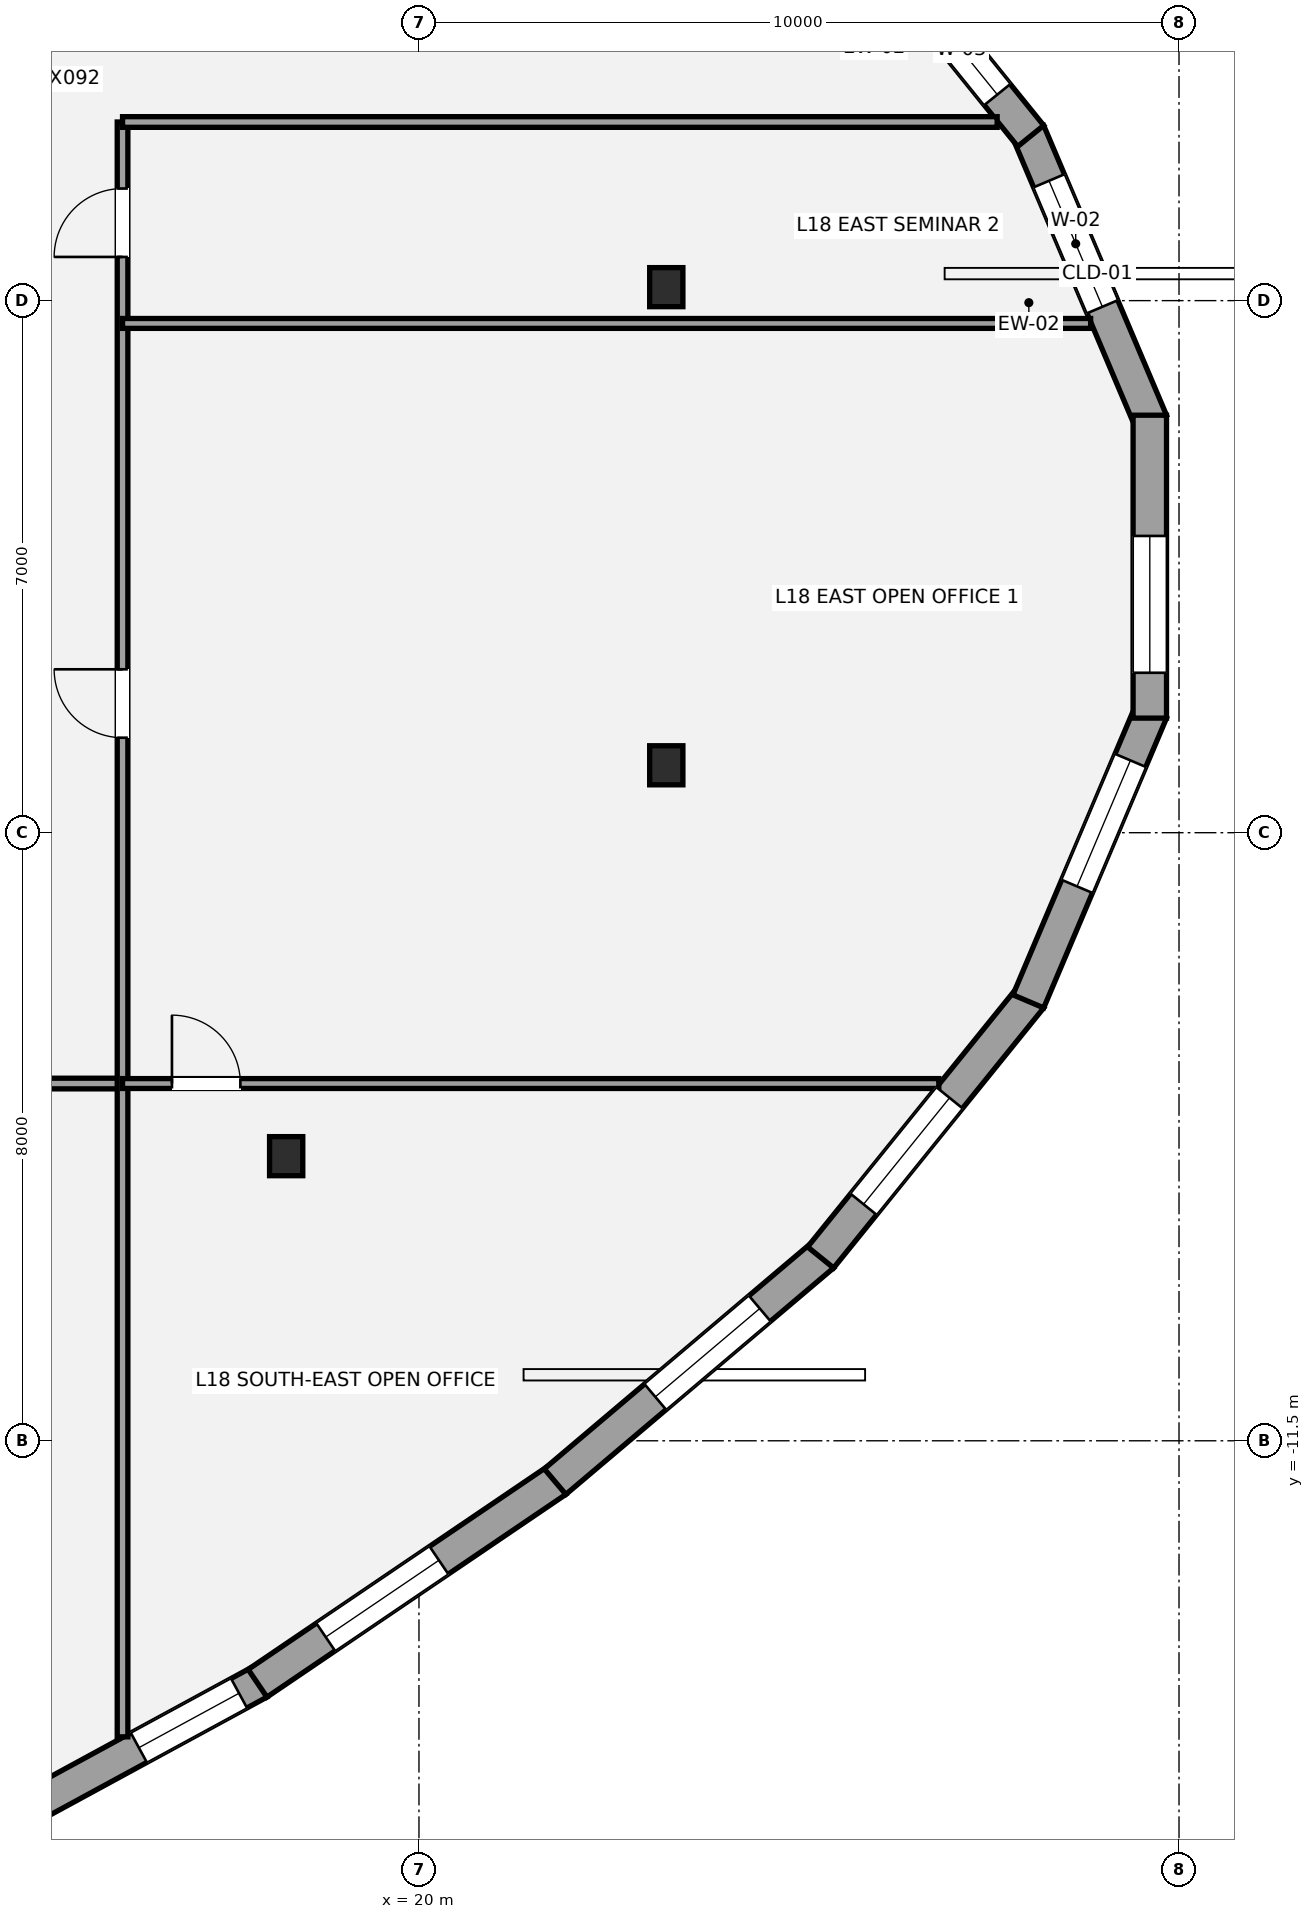
"""IFC4 building model, lengths in metres.
Left out: names, types, materials, properties, quantities, classifications, styles, units other than length and angle.
Written with IfcOpenShell. Run it as: python <this file> out.ifc"""

import sys

from ifc_helpers import new_model, si_unit, direction, frame, frame_2d, origin, origin_2d, place, context, subcontext, project, spatial, rectangle, i_section, extrude, element, fill, save


model = new_model("IFC4")
c1 = context("Model", 3, precision=1e-05, world=origin(), true_north=direction((0.0, 1.0)))
c2 = subcontext(c1, "Body", "Model", "MODEL_VIEW")
j1 = project(units=[si_unit("LENGTHUNIT", "METRE"), si_unit("PLANEANGLEUNIT", "RADIAN")], contexts=[c1])
p1 = place(None, origin())
s1 = spatial("IfcSite", under=j1, at=p1, CompositionType="ELEMENT")
p2 = place(p1, origin())
s2 = spatial("IfcBuilding", under=s1, at=p2, CompositionType="ELEMENT")
p3 = place(p2, frame((0.0, 0.0, 70.2)))
s3 = spatial("IfcBuildingStorey", under=s2, at=p3, CompositionType="ELEMENT", Elevation=70.2)
for number, where, z_axis, x_axis in (
    (1, (23.254, 3.677, 0.0), (0.0, 0.0, 1.0), (1.0, 0.0, 0.0)),
    (2, (18.253, -7.756, 0.0), (0.0, 0.0, 1.0), (1.0, 0.0, 0.0)),
    (3, (23.254, -2.613, 0.0), (0.0, 0.0, 1.0), (1.0, 0.0, 0.0)),
):
    element("IfcColumn", number, at=place(p3, frame(where, z_axis=z_axis, x_axis=x_axis)), inside=s3, PredefinedType="COLUMN", context=c2, shape_type="SweptSolid", body=[
        extrude(i_section(OverallWidth=0.437, OverallDepth=0.514, WebThickness=0.061, FlangeThickness=0.097, at=origin_2d()), origin(), (0.0, 0.0, 1.0), 3.6),
    ])
p4 = place(p3, frame((28.017, 5.719, 0.0), z_axis=(0.0, 0.0, 1.0), x_axis=(0.39024393086, -0.92071150445, 0.0)))
e4 = element("IfcWall", 4, at=p4, inside=s3, PredefinedType="STANDARD", context=c2, shape_type="SweptSolid", body=[
    extrude(rectangle(XDim=4.14, YDim=0.44, at=frame_2d((2.07, 0.0))), origin(), (0.0, 0.0, 1.0), 2.529),
])
p5 = place(p4, frame((0.698, 0.0, 0.65)))
e5 = element("IfcOpeningElement", 5, at=p5, cuts=e4, PredefinedType="OPENING", context=c2, shape_type="SweptSolid", body=[
    extrude(rectangle(XDim=1.8, YDim=1.7, at=frame_2d((0.9, 0.85))), frame((0.0, 0.23, 0.0), z_axis=(0.0, -1.0, 0.0), x_axis=(1.0, 0.0, 0.0)), (0.0, 0.0, 1.0), 0.46),
])
p6 = place(p3, frame((25.284, 9.088, 0.0), z_axis=(0.0, 0.0, 1.0), x_axis=(0.628444327975, -0.777854566507, 0.0)))
e6 = element("IfcWall", 6, at=p6, inside=s3, PredefinedType="STANDARD", context=c2, shape_type="SweptSolid", body=[
    extrude(rectangle(XDim=4.399, YDim=0.44, at=frame_2d((2.199, 0.0))), origin(), (0.0, 0.0, 1.0), 2.529),
])
p7 = place(p6, frame((2.199, 0.0, 0.65)))
e7 = element("IfcOpeningElement", 7, at=p7, cuts=e6, PredefinedType="OPENING", context=c2, shape_type="SweptSolid", body=[
    extrude(rectangle(XDim=1.5, YDim=1.7, at=frame_2d((0.75, 0.85))), frame((0.0, 0.23, 0.0), z_axis=(0.0, -1.0, 0.0), x_axis=(1.0, 0.0, 0.0)), (0.0, 0.0, 1.0), 0.46),
])
p8 = place(p3, frame((17.895, -14.679, 0.0), z_axis=(0.0, 0.0, 1.0), x_axis=(-0.878571961318, -0.477609996531, 0.0)))
e8 = element("IfcWall", 8, at=p8, inside=s3, PredefinedType="STANDARD", context=c2, shape_type="SweptSolid", body=[
    extrude(rectangle(XDim=5.001, YDim=0.44, at=frame_2d((2.5, 0.0))), origin(), (0.0, 0.0, 1.0), 2.529),
])
p9 = place(p8, frame((0.298, 0.0, 0.65)))
e9 = element("IfcOpeningElement", 9, at=p9, cuts=e8, PredefinedType="OPENING", context=c2, shape_type="SweptSolid", body=[
    extrude(rectangle(XDim=1.5, YDim=1.7, at=frame_2d((0.75, 0.85))), frame((0.0, 0.23, 0.0), z_axis=(0.0, -1.0, 0.0), x_axis=(1.0, 0.0, 0.0)), (0.0, 0.0, 1.0), 0.46),
])
p10 = place(p3, frame((21.809, -12.023, 0.0), z_axis=(0.0, 0.0, 1.0), x_axis=(-0.827645395623, -0.561251368911, 0.0)))
e10 = element("IfcWall", 10, at=p10, inside=s3, PredefinedType="STANDARD", context=c2, shape_type="SweptSolid", body=[
    extrude(rectangle(XDim=4.752, YDim=0.44, at=frame_2d((2.376, 0.0))), origin(), (0.0, 0.0, 1.0), 2.529),
])
p11 = place(p10, frame((1.869, 0.0, 0.65)))
e11 = element("IfcOpeningElement", 11, at=p11, cuts=e10, PredefinedType="OPENING", context=c2, shape_type="SweptSolid", body=[
    extrude(rectangle(XDim=1.8, YDim=1.7, at=frame_2d((0.9, 0.85))), frame((0.0, 0.23, 0.0), z_axis=(0.0, -1.0, 0.0), x_axis=(1.0, 0.0, 0.0)), (0.0, 0.0, 1.0), 0.46),
])
p12 = place(p3, frame((25.313, -9.058, 0.0), z_axis=(0.0, 0.0, 1.0), x_axis=(-0.763546839071, -0.645752448346, 0.0)))
e12 = element("IfcWall", 12, at=p12, inside=s3, PredefinedType="STANDARD", context=c2, shape_type="SweptSolid", body=[
    extrude(rectangle(XDim=4.614, YDim=0.44, at=frame_2d((2.307, 0.0))), origin(), (0.0, 0.0, 1.0), 2.529),
])
p13 = place(p12, frame((1.087, 0.0, 0.65)))
e13 = element("IfcOpeningElement", 13, at=p13, cuts=e12, PredefinedType="OPENING", context=c2, shape_type="SweptSolid", body=[
    extrude(rectangle(XDim=1.8, YDim=1.7, at=frame_2d((0.9, 0.85))), frame((0.0, 0.23, 0.0), z_axis=(0.0, -1.0, 0.0), x_axis=(1.0, 0.0, 0.0)), (0.0, 0.0, 1.0), 0.46),
])
p14 = place(p3, frame((28.049, -5.666, 0.0), z_axis=(0.0, 0.0, 1.0), x_axis=(-0.628444327975, -0.777854566507, 0.0)))
e14 = element("IfcWall", 14, at=p14, inside=s3, PredefinedType="STANDARD", context=c2, shape_type="SweptSolid", body=[
    extrude(rectangle(XDim=4.399, YDim=0.44, at=frame_2d((2.199, 0.0))), origin(), (0.0, 0.0, 1.0), 2.529),
])
p15 = place(p14, frame((1.699, 0.0, 0.65)))
e15 = element("IfcOpeningElement", 15, at=p15, cuts=e14, PredefinedType="OPENING", context=c2, shape_type="SweptSolid", body=[
    extrude(rectangle(XDim=1.8, YDim=1.7, at=frame_2d((0.9, 0.85))), frame((0.0, 0.23, 0.0), z_axis=(0.0, -1.0, 0.0), x_axis=(1.0, 0.0, 0.0)), (0.0, 0.0, 1.0), 0.46),
])
p16 = place(p3, frame((29.633, -1.907, 0.0), z_axis=(0.0, 0.0, 1.0), x_axis=(-0.39024393086, -0.92071150445, 0.0)))
e16 = element("IfcWall", 16, at=p16, inside=s3, PredefinedType="STANDARD", context=c2, shape_type="SweptSolid", body=[
    extrude(rectangle(XDim=4.14, YDim=0.44, at=frame_2d((2.07, 0.0))), origin(), (0.0, 0.0, 1.0), 2.529),
])
p17 = place(p16, frame((0.698, 0.0, 0.65)))
e17 = element("IfcOpeningElement", 17, at=p17, cuts=e16, PredefinedType="OPENING", context=c2, shape_type="SweptSolid", body=[
    extrude(rectangle(XDim=1.8, YDim=1.7, at=frame_2d((0.9, 0.85))), frame((0.0, 0.23, 0.0), z_axis=(0.0, -1.0, 0.0), x_axis=(1.0, 0.0, 0.0)), (0.0, 0.0, 1.0), 0.46),
])
p18 = place(p3, frame((29.615, 1.993, 0.0), z_axis=(0.0, 0.0, 1.0), x_axis=(0.0, -1.0, 0.0)))
e18 = element("IfcWall", 18, at=p18, inside=s3, PredefinedType="STANDARD", context=c2, shape_type="SweptSolid", body=[
    extrude(rectangle(XDim=3.985, YDim=0.44, at=frame_2d((1.993, 0.0))), origin(), (0.0, 0.0, 1.0), 2.529),
])
p19 = place(p18, frame((1.588, 0.0, 0.65)))
e19 = element("IfcOpeningElement", 19, at=p19, cuts=e18, PredefinedType="OPENING", context=c2, shape_type="SweptSolid", body=[
    extrude(rectangle(XDim=1.8, YDim=1.7, at=frame_2d((0.9, 0.85))), frame((0.0, 0.23, 0.0), z_axis=(0.0, -1.0, 0.0), x_axis=(1.0, 0.0, 0.0)), (0.0, 0.0, 1.0), 0.46),
])
p20 = place(p3, frame((-18.6, -6.8, 0.0), z_axis=(0.0, 0.0, 1.0), x_axis=(1.0, 0.0, 0.0)))
e20 = element("IfcWall", 20, at=p20, inside=s3, PredefinedType="PARTITIONING", context=c2, shape_type="SweptSolid", body=[
    extrude(rectangle(XDim=34.7, YDim=0.14, at=frame_2d((17.35, 0.0))), origin(), (0.0, 0.0, 1.0), 2.853),
])
p21 = place(p20, frame((4.35, 0.0, 0.0)))
e21 = element("IfcOpeningElement", 21, at=p21, cuts=e20, PredefinedType="OPENING", context=c2, shape_type="SweptSolid", body=[
    extrude(rectangle(XDim=0.9, YDim=2.1, at=frame_2d((0.45, 1.05))), frame((0.0, 0.08, 0.0), z_axis=(0.0, -1.0, 0.0), x_axis=(1.0, 0.0, 0.0)), (0.0, 0.0, 1.0), 0.16),
])
p22 = place(p20, frame((13.65, 0.0, 0.0)))
e22 = element("IfcOpeningElement", 22, at=p22, cuts=e20, PredefinedType="OPENING", context=c2, shape_type="SweptSolid", body=[
    extrude(rectangle(XDim=0.9, YDim=2.1, at=frame_2d((0.45, 1.05))), frame((0.0, 0.08, 0.0), z_axis=(0.0, -1.0, 0.0), x_axis=(1.0, 0.0, 0.0)), (0.0, 0.0, 1.0), 0.16),
])
p23 = place(p20, frame((22.65, 0.0, 0.0)))
e23 = element("IfcOpeningElement", 23, at=p23, cuts=e20, PredefinedType="OPENING", context=c2, shape_type="SweptSolid", body=[
    extrude(rectangle(XDim=0.9, YDim=2.1, at=frame_2d((0.45, 1.05))), frame((0.0, 0.08, 0.0), z_axis=(0.0, -1.0, 0.0), x_axis=(1.0, 0.0, 0.0)), (0.0, 0.0, 1.0), 0.16),
])
p24 = place(p20, frame((30.4, 0.0, 0.0)))
e24 = element("IfcOpeningElement", 24, at=p24, cuts=e20, PredefinedType="OPENING", context=c2, shape_type="SweptSolid", body=[
    extrude(rectangle(XDim=1.5, YDim=2.15, at=frame_2d((0.75, 1.075))), frame((0.0, 0.08, 0.0), z_axis=(0.0, -1.0, 0.0), x_axis=(1.0, 0.0, 0.0)), (0.0, 0.0, 1.0), 0.16),
])
p25 = place(p3, frame((16.1, -15.395, 0.0), z_axis=(0.0, 0.0, 1.0), x_axis=(0.0, 1.0, 0.0)))
e25 = element("IfcWall", 25, at=p25, inside=s3, PredefinedType="PARTITIONING", context=c2, shape_type="SweptSolid", body=[
    extrude(rectangle(XDim=21.245, YDim=0.14, at=frame_2d((10.623, 0.0))), origin(), (0.0, 0.0, 1.0), 2.841),
])
p26 = place(p25, frame((13.145, 0.0, 0.0)))
e26 = element("IfcOpeningElement", 26, at=p26, cuts=e25, PredefinedType="OPENING", context=c2, shape_type="SweptSolid", body=[
    extrude(rectangle(XDim=0.9, YDim=2.1, at=frame_2d((0.45, 1.05))), frame((0.0, 0.08, 0.0), z_axis=(0.0, -1.0, 0.0), x_axis=(1.0, 0.0, 0.0)), (0.0, 0.0, 1.0), 0.16),
])
p27 = place(p25, frame((19.47, 0.0, 0.0)))
e27 = element("IfcOpeningElement", 27, at=p27, cuts=e25, PredefinedType="OPENING", context=c2, shape_type="SweptSolid", body=[
    extrude(rectangle(XDim=0.9, YDim=2.1, at=frame_2d((0.45, 1.05))), frame((0.0, 0.08, 0.0), z_axis=(0.0, -1.0, 0.0), x_axis=(1.0, 0.0, 0.0)), (0.0, 0.0, 1.0), 0.16),
])
p28 = place(p3, frame((16.1, 5.85, 0.0), z_axis=(0.0, 0.0, 1.0), x_axis=(1.0, 0.0, 0.0)))
e28 = element("IfcWall", 28, at=p28, inside=s3, PredefinedType="PARTITIONING", context=c2, shape_type="SweptSolid", body=[
    extrude(rectangle(XDim=11.507, YDim=0.14, at=frame_2d((5.754, 0.0))), origin(), (0.0, 0.0, 1.0), 2.853),
])
p29 = place(p3, frame((16.1, -6.8, 0.0), z_axis=(0.0, 0.0, 1.0), x_axis=(1.0, 0.0, 0.0)))
e29 = element("IfcWall", 29, at=p29, inside=s3, PredefinedType="PARTITIONING", context=c2, shape_type="SweptSolid", body=[
    extrude(rectangle(XDim=10.74, YDim=0.13, at=frame_2d((5.37, 0.0))), origin(), (0.0, 0.0, 1.0), 2.779),
])
p30 = place(p29, frame((0.65, 0.0, 0.0)))
e30 = element("IfcOpeningElement", 30, at=p30, cuts=e29, PredefinedType="OPENING", context=c2, shape_type="SweptSolid", body=[
    extrude(rectangle(XDim=0.9, YDim=2.1, at=frame_2d((0.45, 1.05))), frame((0.0, 0.075, 0.0), z_axis=(0.0, -1.0, 0.0), x_axis=(1.0, 0.0, 0.0)), (0.0, 0.0, 1.0), 0.15),
])
p31 = place(p3, frame((16.1, 3.2, 0.0), z_axis=(0.0, 0.0, 1.0), x_axis=(1.0, 0.0, 0.0)))
e31 = element("IfcWall", 31, at=p31, inside=s3, PredefinedType="PARTITIONING", context=c2, shape_type="SweptSolid", body=[
    extrude(rectangle(XDim=12.737, YDim=0.13, at=frame_2d((6.369, 0.0))), origin(), (0.0, 0.0, 1.0), 2.841),
])
p32 = place(p5, origin())
e32 = element("IfcWindow", 32, at=p32, inside=s3, PartitioningType="SINGLE_PANEL", PredefinedType="WINDOW", context=c2, shape_type="SweptSolid", body=[
    extrude(rectangle(XDim=1.8, YDim=1.7, at=frame_2d((0.9, 0.85))), frame((0.0, -0.01, 0.0), z_axis=(0.0, -1.0, 0.0), x_axis=(1.0, 0.0, 0.0)), (0.0, 0.0, 1.0), 0.06),
])
fill(e5, e32)
p33 = place(p7, origin())
e33 = element("IfcWindow", 33, at=p33, inside=s3, PartitioningType="SINGLE_PANEL", PredefinedType="WINDOW", context=c2, shape_type="SweptSolid", body=[
    extrude(rectangle(XDim=1.5, YDim=1.7, at=frame_2d((0.75, 0.85))), frame((0.0, -0.01, 0.0), z_axis=(0.0, -1.0, 0.0), x_axis=(1.0, 0.0, 0.0)), (0.0, 0.0, 1.0), 0.06),
])
fill(e7, e33)
p34 = place(p9, origin())
e34 = element("IfcWindow", 34, at=p34, inside=s3, PartitioningType="SINGLE_PANEL", PredefinedType="WINDOW", context=c2, shape_type="SweptSolid", body=[
    extrude(rectangle(XDim=1.5, YDim=1.7, at=frame_2d((0.75, 0.85))), frame((0.0, -0.01, 0.0), z_axis=(0.0, -1.0, 0.0), x_axis=(1.0, 0.0, 0.0)), (0.0, 0.0, 1.0), 0.06),
])
fill(e9, e34)
p35 = place(p11, origin())
e35 = element("IfcWindow", 35, at=p35, inside=s3, PartitioningType="SINGLE_PANEL", PredefinedType="WINDOW", context=c2, shape_type="SweptSolid", body=[
    extrude(rectangle(XDim=1.8, YDim=1.7, at=frame_2d((0.9, 0.85))), frame((0.0, -0.01, 0.0), z_axis=(0.0, -1.0, 0.0), x_axis=(1.0, 0.0, 0.0)), (0.0, 0.0, 1.0), 0.06),
])
fill(e11, e35)
p36 = place(p13, origin())
e36 = element("IfcWindow", 36, at=p36, inside=s3, PartitioningType="SINGLE_PANEL", PredefinedType="WINDOW", context=c2, shape_type="SweptSolid", body=[
    extrude(rectangle(XDim=1.8, YDim=1.7, at=frame_2d((0.9, 0.85))), frame((0.0, -0.01, 0.0), z_axis=(0.0, -1.0, 0.0), x_axis=(1.0, 0.0, 0.0)), (0.0, 0.0, 1.0), 0.06),
])
fill(e13, e36)
p37 = place(p15, origin())
e37 = element("IfcWindow", 37, at=p37, inside=s3, PartitioningType="SINGLE_PANEL", PredefinedType="WINDOW", context=c2, shape_type="SweptSolid", body=[
    extrude(rectangle(XDim=1.8, YDim=1.7, at=frame_2d((0.9, 0.85))), frame((0.0, -0.01, 0.0), z_axis=(0.0, -1.0, 0.0), x_axis=(1.0, 0.0, 0.0)), (0.0, 0.0, 1.0), 0.06),
])
fill(e15, e37)
p38 = place(p17, origin())
e38 = element("IfcWindow", 38, at=p38, inside=s3, PartitioningType="SINGLE_PANEL", PredefinedType="WINDOW", context=c2, shape_type="SweptSolid", body=[
    extrude(rectangle(XDim=1.8, YDim=1.7, at=frame_2d((0.9, 0.85))), frame((0.0, -0.01, 0.0), z_axis=(0.0, -1.0, 0.0), x_axis=(1.0, 0.0, 0.0)), (0.0, 0.0, 1.0), 0.06),
])
fill(e17, e38)
p39 = place(p19, origin())
e39 = element("IfcWindow", 39, at=p39, inside=s3, PartitioningType="SINGLE_PANEL", PredefinedType="WINDOW", context=c2, shape_type="SweptSolid", body=[
    extrude(rectangle(XDim=1.8, YDim=1.7, at=frame_2d((0.9, 0.85))), frame((0.0, -0.01, 0.0), z_axis=(0.0, -1.0, 0.0), x_axis=(1.0, 0.0, 0.0)), (0.0, 0.0, 1.0), 0.06),
])
fill(e19, e39)
p40 = place(p30, origin())
e40 = element("IfcDoor", 40, at=p40, inside=s3, OperationType="SINGLE_SWING_LEFT", PredefinedType="DOOR", context=c2, shape_type="SweptSolid", body=[
    extrude(rectangle(XDim=0.9, YDim=2.1, at=frame_2d((0.45, 1.05))), frame((0.0, 0.025, 0.0), z_axis=(0.0, -1.0, 0.0), x_axis=(1.0, 0.0, 0.0)), (0.0, 0.0, 1.0), 0.05),
])
fill(e30, e40)
p41 = place(p26, origin())
e41 = element("IfcDoor", 41, at=p41, inside=s3, OperationType="SINGLE_SWING_RIGHT", PredefinedType="DOOR", context=c2, shape_type="SweptSolid", body=[
    extrude(rectangle(XDim=0.9, YDim=2.1, at=frame_2d((0.45, 1.05))), frame((0.0, 0.025, 0.0), z_axis=(0.0, -1.0, 0.0), x_axis=(1.0, 0.0, 0.0)), (0.0, 0.0, 1.0), 0.05),
])
fill(e26, e41)
p42 = place(p27, origin())
e42 = element("IfcDoor", 42, at=p42, inside=s3, OperationType="SINGLE_SWING_LEFT", PredefinedType="DOOR", context=c2, shape_type="SweptSolid", body=[
    extrude(rectangle(XDim=0.9, YDim=2.1, at=frame_2d((0.45, 1.05))), frame((0.0, 0.025, 0.0), z_axis=(0.0, -1.0, 0.0), x_axis=(1.0, 0.0, 0.0)), (0.0, 0.0, 1.0), 0.05),
])
fill(e27, e42)
save(model, sys.argv[1])
